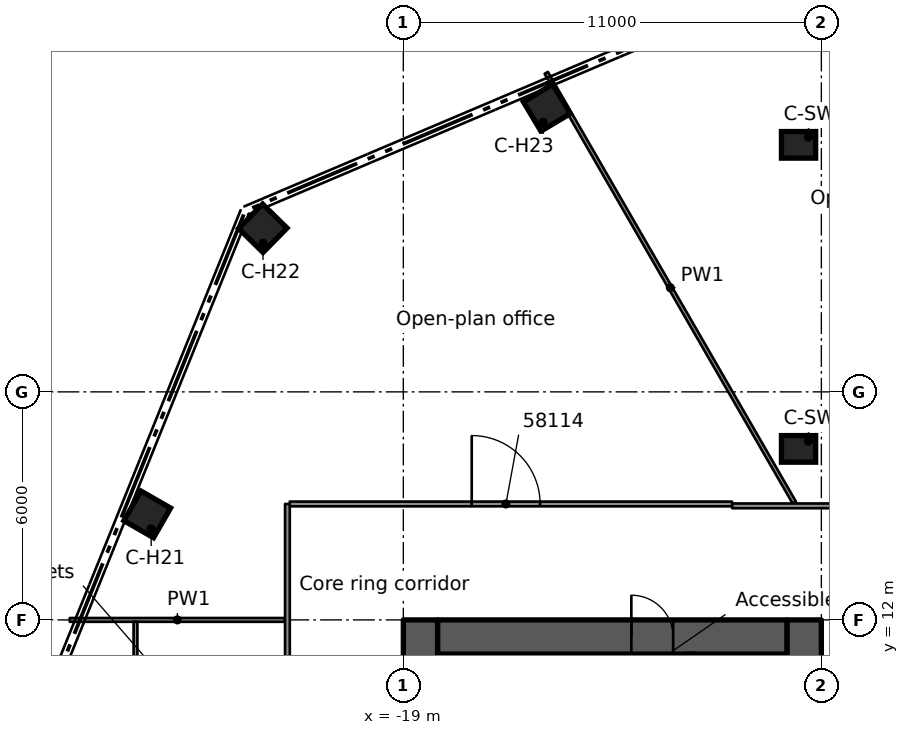
"""IFC4 building model, lengths in metres.
Left out: names, types, materials, properties, quantities, classifications, styles, units other than length and angle.
Written with IfcOpenShell. Run it as: python <this file> out.ifc"""

import sys

from ifc_helpers import new_model, si_unit, direction, frame, frame_2d, origin, origin_2d, place, context, subcontext, project, spatial, rectangle, extrude, element, fill, save


model = new_model("IFC4")
c1 = context("Model", 3, precision=1e-05, world=origin(), true_north=direction((0.0, 1.0)))
c2 = subcontext(c1, "Body", "Model", "MODEL_VIEW")
j1 = project(units=[si_unit("LENGTHUNIT", "METRE"), si_unit("PLANEANGLEUNIT", "RADIAN")], contexts=[c1])
p1 = place(None, origin())
s1 = spatial("IfcSite", under=j1, at=p1, CompositionType="ELEMENT")
p2 = place(p1, origin())
s2 = spatial("IfcBuilding", under=s1, at=p2, CompositionType="ELEMENT")
p3 = place(p2, frame((0.0, 0.0, 285.9)))
s3 = spatial("IfcBuildingStorey", under=s2, at=p3, CompositionType="ELEMENT", Elevation=285.9)
p4 = place(p3, frame((-18.1, 11.55, 0.0), z_axis=(0.0, 0.0, 1.0), x_axis=(1.0, 0.0, 0.0)))
e1 = element("IfcWall", 1, at=p4, inside=s3, PredefinedType="SHEAR", context=c2, shape_type="SweptSolid", body=[
    extrude(rectangle(XDim=9.2, YDim=0.9, at=frame_2d((4.6, 0.0))), origin(), (0.0, 0.0, 1.0), 3.5),
])
p5 = place(p4, frame((5.1, 0.0, 0.0)))
e2 = element("IfcOpeningElement", 2, at=p5, cuts=e1, PredefinedType="OPENING", context=c2, shape_type="SweptSolid", body=[
    extrude(rectangle(XDim=1.1, YDim=2.1, at=frame_2d((0.55, 1.05))), frame((0.0, 0.46, 0.0), z_axis=(0.0, -1.0, 0.0), x_axis=(1.0, 0.0, 0.0)), (0.0, 0.0, 1.0), 0.92),
])
p6 = place(p3, frame((-18.55, -12.0, 0.0), z_axis=(0.0, 0.0, 1.0), x_axis=(0.0, 1.0, 0.0)))
e3 = element("IfcWall", 3, at=p6, inside=s3, PredefinedType="SHEAR", context=c2, shape_type="SweptSolid", body=[
    extrude(rectangle(XDim=24.0, YDim=0.9, at=frame_2d((12.0, 0.0))), origin(), (0.0, 0.0, 1.0), 3.5),
])
p7 = place(p6, frame((10.1, 0.0, 0.0)))
e4 = element("IfcOpeningElement", 4, at=p7, cuts=e3, PredefinedType="OPENING", context=c2, shape_type="SweptSolid", body=[
    extrude(rectangle(XDim=1.8, YDim=2.1, at=frame_2d((0.9, 1.05))), frame((0.0, 0.46, 0.0), z_axis=(0.0, -1.0, 0.0), x_axis=(1.0, 0.0, 0.0)), (0.0, 0.0, 1.0), 0.92),
])
p8 = place(p3, frame((-8.45, -12.0, 0.0), z_axis=(0.0, 0.0, 1.0), x_axis=(0.0, 1.0, 0.0)))
e5 = element("IfcWall", 5, at=p8, inside=s3, PredefinedType="SHEAR", context=c2, shape_type="SweptSolid", body=[
    extrude(rectangle(XDim=24.0, YDim=0.9, at=frame_2d((12.0, 0.0))), origin(), (0.0, 0.0, 1.0), 3.5),
])
p9 = place(p8, frame((9.6, 0.0, 0.0)))
e6 = element("IfcOpeningElement", 6, at=p9, cuts=e5, PredefinedType="OPENING", context=c2, shape_type="SweptSolid", body=[
    extrude(rectangle(XDim=1.8, YDim=2.1, at=frame_2d((0.9, 1.05))), frame((0.0, 0.46, 0.0), z_axis=(0.0, -1.0, 0.0), x_axis=(1.0, 0.0, 0.0)), (0.0, 0.0, 1.0), 0.92),
])
p10 = place(p8, frame((19.65, 0.0, 0.0)))
e7 = element("IfcOpeningElement", 7, at=p10, cuts=e5, PredefinedType="OPENING", context=c2, shape_type="SweptSolid", body=[
    extrude(rectangle(XDim=1.1, YDim=2.1, at=frame_2d((0.55, 1.05))), frame((0.0, 0.46, 0.0), z_axis=(0.0, -1.0, 0.0), x_axis=(1.0, 0.0, 0.0)), (0.0, 0.0, 1.0), 0.92),
])
for number, where, z_axis, x_axis in (
    (8, (-25.739, 14.777, 0.0), (0.0, 0.0, 1.0), (-0.867, 0.498, 0.0)),
    (9, (-22.697, 22.305, 0.0), (0.0, 0.0, 1.0), (-0.713, 0.701, 0.0)),
    (10, (-15.224, 25.477, 0.0), (0.0, 0.0, 1.0), (-0.513, 0.858, 0.0)),
):
    element("IfcColumn", number, at=place(p3, frame(where, z_axis=z_axis, x_axis=x_axis)), inside=s3, PredefinedType="COLUMN", context=c2, shape_type="SweptSolid", body=[
        extrude(rectangle(XDim=0.9, YDim=0.9, at=origin_2d()), origin(), (0.0, 0.0, 1.0), 3.5),
    ])
for number, where, z_axis, x_axis in (
    (11, (-8.6, 24.5, 0.0), (0.0, 0.0, 1.0), (1.0, 0.0, 0.0)),
    (12, (-8.6, 16.5, 0.0), (0.0, 0.0, 1.0), (1.0, 0.0, 0.0)),
):
    element("IfcColumn", number, at=place(p3, frame(where, z_axis=z_axis, x_axis=x_axis)), inside=s3, PredefinedType="COLUMN", context=c2, shape_type="SweptSolid", body=[
        extrude(rectangle(XDim=0.9, YDim=0.7, at=origin_2d()), origin(), (0.0, 0.0, 1.0), 3.5),
    ])
p11 = place(p3, frame((-11.44, 6.975, 0.0), z_axis=(0.0, 0.0, 1.0), x_axis=(0.0, 1.0, 0.0)))
e13 = element("IfcWall", 13, at=p11, inside=s3, PredefinedType="SOLIDWALL", context=c2, shape_type="SweptSolid", body=[
    extrude(rectangle(XDim=4.125, YDim=0.2, at=frame_2d((2.062, 0.0))), origin(), (0.0, 0.0, 1.0), 3.09),
])
p12 = place(p11, frame((2.1, 0.0, 0.0)))
e14 = element("IfcOpeningElement", 14, at=p12, cuts=e13, PredefinedType="OPENING", context=c2, shape_type="SweptSolid", body=[
    extrude(rectangle(XDim=1.1, YDim=2.1, at=frame_2d((0.55, 1.05))), frame((0.0, 0.11, 0.0), z_axis=(0.0, -1.0, 0.0), x_axis=(1.0, 0.0, 0.0)), (0.0, 0.0, 1.0), 0.22),
])
p13 = place(p3, frame((-15.239, 26.395, 0.0), z_axis=(0.0, 0.0, 1.0), x_axis=(0.499938284347, -0.866061032401, 0.0)))
e15 = element("IfcWall", 15, at=p13, inside=s3, PredefinedType="PARTITIONING", context=c2, shape_type="SweptSolid", body=[
    extrude(rectangle(XDim=13.056, YDim=0.1, at=frame_2d((6.528, 0.0))), origin(), (0.0, 0.0, 1.0), 3.08),
])
p14 = place(p3, frame((-27.778, 12.0, 0.0), z_axis=(0.0, 0.0, 1.0), x_axis=(1.0, 0.0, 0.0)))
e16 = element("IfcWall", 16, at=p14, inside=s3, PredefinedType="PARTITIONING", context=c2, shape_type="SweptSolid", body=[
    extrude(rectangle(XDim=5.665, YDim=0.1, at=frame_2d((2.833, 0.0))), origin(), (0.0, 0.0, 1.0), 3.08),
])
p15 = place(p3, frame((-10.349, 15.001, 0.0), z_axis=(0.0, 0.0, 1.0), x_axis=(1.0, 0.0, 0.0)))
e17 = element("IfcWall", 17, at=p15, inside=s3, PredefinedType="PARTITIONING", context=c2, shape_type="SweptSolid", body=[
    extrude(rectangle(XDim=21.339, YDim=0.125, at=frame_2d((10.669, 0.0))), origin(), (0.0, 0.0, 1.0), 3.08),
])
p16 = place(p15, frame((13.449, 0.0, 0.0)))
e18 = element("IfcOpeningElement", 18, at=p16, cuts=e17, PredefinedType="OPENING", context=c2, shape_type="SweptSolid", body=[
    extrude(rectangle(XDim=1.8, YDim=2.1, at=frame_2d((0.9, 1.05))), frame((0.0, 0.073, 0.0), z_axis=(0.0, -1.0, 0.0), x_axis=(1.0, 0.0, 0.0)), (0.0, 0.0, 1.0), 0.145),
])
p17 = place(p15, frame((5.038, 0.0, 0.0)))
e19 = element("IfcOpeningElement", 19, at=p17, cuts=e17, PredefinedType="OPENING", context=c2, shape_type="SweptSolid", body=[
    extrude(rectangle(XDim=1.8, YDim=2.1, at=frame_2d((0.9, 1.05))), frame((0.0, 0.073, 0.0), z_axis=(0.0, -1.0, 0.0), x_axis=(1.0, 0.0, 0.0)), (0.0, 0.0, 1.0), 0.145),
])
p18 = place(p3, frame((-21.988, 15.051, 0.0), z_axis=(0.0, 0.0, 1.0), x_axis=(1.0, 0.0, 0.0)))
e20 = element("IfcWall", 20, at=p18, inside=s3, PredefinedType="PARTITIONING", context=c2, shape_type="SweptSolid", body=[
    extrude(rectangle(XDim=11.638, YDim=0.125, at=frame_2d((5.819, 0.0))), origin(), (0.0, 0.0, 1.0), 3.08),
])
p19 = place(p18, frame((4.788, 0.0, 0.0)))
e21 = element("IfcOpeningElement", 21, at=p19, cuts=e20, PredefinedType="OPENING", context=c2, shape_type="SweptSolid", body=[
    extrude(rectangle(XDim=1.8, YDim=2.1, at=frame_2d((0.9, 1.05))), frame((0.0, 0.073, 0.0), z_axis=(0.0, -1.0, 0.0), x_axis=(1.0, 0.0, 0.0)), (0.0, 0.0, 1.0), 0.145),
])
p20 = place(p3, frame((-22.05, -15.051, 0.0), z_axis=(0.0, 0.0, 1.0), x_axis=(0.0, 1.0, 0.0)))
e22 = element("IfcWall", 22, at=p20, inside=s3, PredefinedType="PARTITIONING", context=c2, shape_type="SweptSolid", body=[
    extrude(rectangle(XDim=30.102, YDim=0.125, at=frame_2d((15.051, 0.0))), origin(), (0.0, 0.0, 1.0), 3.08),
])
p21 = place(p20, frame((8.151, 0.0, 0.0)))
e23 = element("IfcOpeningElement", 23, at=p21, cuts=e22, PredefinedType="OPENING", context=c2, shape_type="SweptSolid", body=[
    extrude(rectangle(XDim=1.8, YDim=2.1, at=frame_2d((0.9, 1.05))), frame((0.0, 0.073, 0.0), z_axis=(0.0, -1.0, 0.0), x_axis=(1.0, 0.0, 0.0)), (0.0, 0.0, 1.0), 0.145),
])
p22 = place(p20, frame((12.401, 0.0, 0.0)))
e24 = element("IfcOpeningElement", 24, at=p22, cuts=e22, PredefinedType="OPENING", context=c2, shape_type="SweptSolid", body=[
    extrude(rectangle(XDim=1.8, YDim=2.1, at=frame_2d((0.9, 1.05))), frame((0.0, 0.073, 0.0), z_axis=(0.0, -1.0, 0.0), x_axis=(1.0, 0.0, 0.0)), (0.0, 0.0, 1.0), 0.145),
])
p23 = place(p20, frame((23.652, 0.0, 0.0)))
e25 = element("IfcOpeningElement", 25, at=p23, cuts=e22, PredefinedType="OPENING", context=c2, shape_type="SweptSolid", body=[
    extrude(rectangle(XDim=0.9, YDim=2.1, at=frame_2d((0.45, 1.05))), frame((0.0, 0.073, 0.0), z_axis=(0.0, -1.0, 0.0), x_axis=(1.0, 0.0, 0.0)), (0.0, 0.0, 1.0), 0.145),
])
p24 = place(p20, frame((17.403, 0.0, 0.0)))
e26 = element("IfcOpeningElement", 26, at=p24, cuts=e22, PredefinedType="OPENING", context=c2, shape_type="SweptSolid", body=[
    extrude(rectangle(XDim=1.1, YDim=2.1, at=frame_2d((0.55, 1.05))), frame((0.0, 0.073, 0.0), z_axis=(0.0, -1.0, 0.0), x_axis=(1.0, 0.0, 0.0)), (0.0, 0.0, 1.0), 0.145),
])
p25 = place(p3, frame((-26.048, 6.001, 0.0), z_axis=(0.0, 0.0, 1.0), x_axis=(0.0, 1.0, 0.0)))
e27 = element("IfcWall", 27, at=p25, inside=s3, PredefinedType="PARTITIONING", context=c2, shape_type="SweptSolid", body=[
    extrude(rectangle(XDim=5.949, YDim=0.1, at=frame_2d((2.975, 0.0))), origin(), (0.0, 0.0, 1.0), 3.08),
])
p26 = place(p5, origin())
e28 = element("IfcDoor", 28, at=p26, inside=s3, OperationType="SINGLE_SWING_RIGHT", PredefinedType="DOOR", context=c2, shape_type="SweptSolid", body=[
    extrude(rectangle(XDim=1.1, YDim=2.1, at=frame_2d((0.55, 1.05))), frame((0.0, 0.025, 0.0), z_axis=(0.0, -1.0, 0.0), x_axis=(1.0, 0.0, 0.0)), (0.0, 0.0, 1.0), 0.05),
])
fill(e2, e28)
p27 = place(p19, origin())
e29 = element("IfcDoor", 29, at=p27, inside=s3, OperationType="DOUBLE_DOOR_SINGLE_SWING", PredefinedType="DOOR", context=c2, shape_type="SweptSolid", body=[
    extrude(rectangle(XDim=1.8, YDim=2.1, at=frame_2d((0.9, 1.05))), frame((0.0, 0.025, 0.0), z_axis=(0.0, -1.0, 0.0), x_axis=(1.0, 0.0, 0.0)), (0.0, 0.0, 1.0), 0.05),
])
fill(e21, e29)
save(model, sys.argv[1])
